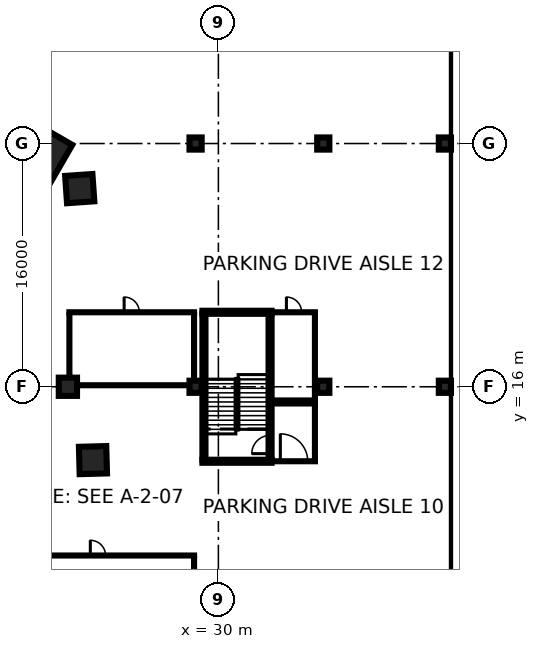
"""IFC4 building model, lengths in metres.
Left out: names, types, materials, properties, quantities, classifications, styles, units other than length and angle.
Written with IfcOpenShell. Run it as: python <this file> out.ifc"""

import sys

from ifc_helpers import new_model, si_unit, direction, frame, frame_2d, origin, origin_2d, place, context, subcontext, project, spatial, rectangle, extrude, element, fill, save


model = new_model("IFC4")
c1 = context("Model", 3, precision=1e-05, world=origin(), true_north=direction((0.0, 1.0)))
c2 = subcontext(c1, "Body", "Model", "MODEL_VIEW")
j1 = project(units=[si_unit("LENGTHUNIT", "METRE"), si_unit("PLANEANGLEUNIT", "RADIAN")], contexts=[c1])
p1 = place(None, origin())
s1 = spatial("IfcSite", under=j1, at=p1, CompositionType="ELEMENT")
p2 = place(p1, origin())
s2 = spatial("IfcBuilding", under=s1, at=p2, CompositionType="ELEMENT")
p3 = place(p2, frame((0.0, 0.0, -12.0)))
s3 = spatial("IfcBuildingStorey", under=s2, at=p3, CompositionType="ELEMENT", Elevation=-12.0)
p4 = place(p3, frame((45.75, -80.0, 0.0), z_axis=(0.0, 0.0, 1.0), x_axis=(0.0, 1.0, 0.0)))
e1 = element("IfcWall", 1, at=p4, inside=s3, PredefinedType="USERDEFINED", context=c2, shape_type="SweptSolid", body=[
    extrude(rectangle(XDim=160.0, YDim=0.9, at=frame_2d((80.0, 0.0))), origin(), (0.0, 0.0, 1.0), 11.55),
])
p5 = place(p2, frame((0.0, 0.0, -3.6)))
s4 = spatial("IfcBuildingStorey", under=s2, at=p5, CompositionType="ELEMENT", Elevation=-3.6)
p6 = place(p5, frame((17.865, 30.942, -0.4), z_axis=(0.0, 0.0, 1.0), x_axis=(0.5, 0.866025403784, 0.0)))
e2 = element("IfcColumn", 2, at=p6, inside=s4, PredefinedType="COLUMN", context=c2, shape_type="SweptSolid", body=[
    extrude(rectangle(XDim=4.2, YDim=3.4, at=origin_2d()), origin(), (0.0, 0.0, 1.0), 3.55),
])
for number, where, z_axis, x_axis in (
    (3, (21.749, 11.174, -0.4), (0.0, 0.0, 1.0), (1.0, 0.027, 0.0)),
    (4, (20.879, 29.034, -0.4), (0.0, 0.0, 1.0), (0.998, 0.07, 0.0)),
):
    element("IfcColumn", number, at=place(p5, frame(where, z_axis=z_axis, x_axis=x_axis)), inside=s4, PredefinedType="COLUMN", context=c2, shape_type="SweptSolid", body=[
        extrude(rectangle(XDim=1.8, YDim=1.8, at=origin_2d()), origin(), (0.0, 0.0, 1.0), 3.55),
    ])
p7 = place(p5, frame((20.1, 16.0, -0.4), z_axis=(0.0, 0.0, 1.0), x_axis=(1.0, 0.0, 0.0)))
e5 = element("IfcColumn", 5, at=p7, inside=s4, PredefinedType="COLUMN", context=c2, shape_type="SweptSolid", body=[
    extrude(rectangle(XDim=1.2, YDim=1.2, at=origin_2d()), origin(), (0.0, 0.0, 1.0), 3.55),
])
for number, where, z_axis, x_axis in (
    (6, (28.5, 16.0, -0.4), (0.0, 0.0, 1.0), (1.0, 0.0, 0.0)),
    (7, (28.5, 32.0, -0.4), (0.0, 0.0, 1.0), (1.0, 0.0, 0.0)),
    (8, (36.9, 16.0, -0.4), (0.0, 0.0, 1.0), (1.0, 0.0, 0.0)),
    (9, (36.9, 32.0, -0.4), (0.0, 0.0, 1.0), (1.0, 0.0, 0.0)),
    (10, (44.9, 16.0, -0.4), (0.0, 0.0, 1.0), (1.0, 0.0, 0.0)),
    (11, (44.9, 32.0, -0.4), (0.0, 0.0, 1.0), (1.0, 0.0, 0.0)),
):
    element("IfcColumn", number, at=place(p5, frame(where, z_axis=z_axis, x_axis=x_axis)), inside=s4, PredefinedType="COLUMN", context=c2, shape_type="SweptSolid", body=[
        extrude(rectangle(XDim=0.8, YDim=0.8, at=origin_2d()), origin(), (0.0, 0.0, 1.0), 3.55),
    ])
p8 = place(p5, frame((15.653, 4.9, 0.0), z_axis=(0.0, 0.0, 1.0), x_axis=(1.0, 0.0, 0.0)))
e12 = element("IfcWall", 12, at=p8, inside=s4, PredefinedType="PARTITIONING", context=c2, shape_type="SweptSolid", body=[
    extrude(rectangle(XDim=12.847, YDim=0.2, at=frame_2d((6.424, 0.0))), origin(), (0.0, 0.0, 1.0), 3.15),
])
p9 = place(p8, frame((5.924, 0.0, 0.0)))
e13 = element("IfcOpeningElement", 13, at=p9, cuts=e12, PredefinedType="OPENING", context=c2, shape_type="SweptSolid", body=[
    extrude(rectangle(XDim=1.0, YDim=2.1, at=frame_2d((0.5, 1.05))), frame((0.0, 0.11, 0.0), z_axis=(0.0, -1.0, 0.0), x_axis=(1.0, 0.0, 0.0)), (0.0, 0.0, 1.0), 0.22),
])
p10 = place(p5, frame((28.4, 0.4, 0.0), z_axis=(0.0, 0.0, 1.0), x_axis=(0.0, 1.0, 0.0)))
e14 = element("IfcWall", 14, at=p10, inside=s4, PredefinedType="PARTITIONING", context=c2, shape_type="SweptSolid", body=[
    extrude(rectangle(XDim=4.4, YDim=0.2, at=frame_2d((2.2, 0.0))), origin(), (0.0, 0.0, 1.0), 3.15),
])
p11 = place(p5, frame((20.1, 16.1, 0.0), z_axis=(0.0, 0.0, 1.0), x_axis=(1.0, 0.0, 0.0)))
e15 = element("IfcWall", 15, at=p11, inside=s4, PredefinedType="PARTITIONING", context=c2, shape_type="SweptSolid", body=[
    extrude(rectangle(XDim=8.4, YDim=0.2, at=frame_2d((4.2, 0.0))), origin(), (0.0, 0.0, 1.0), 3.15),
])
p12 = place(p5, frame((20.1, 20.9, 0.0), z_axis=(0.0, 0.0, 1.0), x_axis=(1.0, 0.0, 0.0)))
e16 = element("IfcWall", 16, at=p12, inside=s4, PredefinedType="PARTITIONING", context=c2, shape_type="SweptSolid", body=[
    extrude(rectangle(XDim=8.4, YDim=0.2, at=frame_2d((4.2, 0.0))), origin(), (0.0, 0.0, 1.0), 3.15),
])
p13 = place(p12, frame((3.7, 0.0, 0.0)))
e17 = element("IfcOpeningElement", 17, at=p13, cuts=e16, PredefinedType="OPENING", context=c2, shape_type="SweptSolid", body=[
    extrude(rectangle(XDim=1.0, YDim=2.1, at=frame_2d((0.5, 1.05))), frame((0.0, 0.11, 0.0), z_axis=(0.0, -1.0, 0.0), x_axis=(1.0, 0.0, 0.0)), (0.0, 0.0, 1.0), 0.22),
])
p14 = place(p5, frame((20.2, 16.6, 0.0), z_axis=(0.0, 0.0, 1.0), x_axis=(0.0, 1.0, 0.0)))
e18 = element("IfcWall", 18, at=p14, inside=s4, PredefinedType="PARTITIONING", context=c2, shape_type="SweptSolid", body=[
    extrude(rectangle(XDim=4.2, YDim=0.2, at=frame_2d((2.1, 0.0))), origin(), (0.0, 0.0, 1.0), 3.15),
])
p15 = place(p5, frame((28.4, 16.4, 0.0), z_axis=(0.0, 0.0, 1.0), x_axis=(0.0, 1.0, 0.0)))
e19 = element("IfcWall", 19, at=p15, inside=s4, PredefinedType="PARTITIONING", context=c2, shape_type="SweptSolid", body=[
    extrude(rectangle(XDim=4.4, YDim=0.2, at=frame_2d((2.2, 0.0))), origin(), (0.0, 0.0, 1.0), 3.15),
])
p16 = place(p5, frame((33.5, 11.1, 0.0), z_axis=(0.0, 0.0, 1.0), x_axis=(1.0, 0.0, 0.0)))
e20 = element("IfcWall", 20, at=p16, inside=s4, PredefinedType="PARTITIONING", context=c2, shape_type="SweptSolid", body=[
    extrude(rectangle(XDim=2.95, YDim=0.2, at=frame_2d((1.475, 0.0))), origin(), (0.0, 0.0, 1.0), 3.15),
])
p17 = place(p16, frame((0.575, 0.0, 0.0)))
e21 = element("IfcOpeningElement", 21, at=p17, cuts=e20, PredefinedType="OPENING", context=c2, shape_type="SweptSolid", body=[
    extrude(rectangle(XDim=1.8, YDim=2.1, at=frame_2d((0.9, 1.05))), frame((0.0, 0.11, 0.0), z_axis=(0.0, -1.0, 0.0), x_axis=(1.0, 0.0, 0.0)), (0.0, 0.0, 1.0), 0.22),
])
p18 = place(p5, frame((33.5, 14.9, 0.0), z_axis=(0.0, 0.0, 1.0), x_axis=(1.0, 0.0, 0.0)))
e22 = element("IfcWall", 22, at=p18, inside=s4, PredefinedType="PARTITIONING", context=c2, shape_type="SweptSolid", body=[
    extrude(rectangle(XDim=2.95, YDim=0.2, at=frame_2d((1.475, 0.0))), origin(), (0.0, 0.0, 1.0), 3.15),
])
p19 = place(p5, frame((36.35, 11.2, 0.0), z_axis=(0.0, 0.0, 1.0), x_axis=(0.0, 1.0, 0.0)))
e23 = element("IfcWall", 23, at=p19, inside=s4, PredefinedType="PARTITIONING", context=c2, shape_type="SweptSolid", body=[
    extrude(rectangle(XDim=3.6, YDim=0.2, at=frame_2d((1.8, 0.0))), origin(), (0.0, 0.0, 1.0), 3.15),
])
p20 = place(p5, frame((33.5, 15.1, 0.0), z_axis=(0.0, 0.0, 1.0), x_axis=(1.0, 0.0, 0.0)))
e24 = element("IfcWall", 24, at=p20, inside=s4, PredefinedType="PARTITIONING", context=c2, shape_type="SweptSolid", body=[
    extrude(rectangle(XDim=2.95, YDim=0.2, at=frame_2d((1.475, 0.0))), origin(), (0.0, 0.0, 1.0), 3.15),
])
p21 = place(p5, frame((33.5, 20.9, 0.0), z_axis=(0.0, 0.0, 1.0), x_axis=(1.0, 0.0, 0.0)))
e25 = element("IfcWall", 25, at=p21, inside=s4, PredefinedType="PARTITIONING", context=c2, shape_type="SweptSolid", body=[
    extrude(rectangle(XDim=2.95, YDim=0.2, at=frame_2d((1.475, 0.0))), origin(), (0.0, 0.0, 1.0), 3.15),
])
p22 = place(p21, frame((0.975, 0.0, 0.0)))
e26 = element("IfcOpeningElement", 26, at=p22, cuts=e25, PredefinedType="OPENING", context=c2, shape_type="SweptSolid", body=[
    extrude(rectangle(XDim=1.0, YDim=2.1, at=frame_2d((0.5, 1.05))), frame((0.0, 0.11, 0.0), z_axis=(0.0, -1.0, 0.0), x_axis=(1.0, 0.0, 0.0)), (0.0, 0.0, 1.0), 0.22),
])
p23 = place(p5, frame((36.35, 15.2, 0.0), z_axis=(0.0, 0.0, 1.0), x_axis=(0.0, 1.0, 0.0)))
e27 = element("IfcWall", 27, at=p23, inside=s4, PredefinedType="PARTITIONING", context=c2, shape_type="SweptSolid", body=[
    extrude(rectangle(XDim=5.6, YDim=0.2, at=frame_2d((2.8, 0.0))), origin(), (0.0, 0.0, 1.0), 3.15),
])
p24 = place(p5, frame((29.05, 11.2, 0.0), z_axis=(0.0, 0.0, 1.0), x_axis=(0.0, 1.0, 0.0)))
e28 = element("IfcWall", 28, at=p24, inside=s4, PredefinedType="SOLIDWALL", context=c2, shape_type="SweptSolid", body=[
    extrude(rectangle(XDim=9.6, YDim=0.2, at=frame_2d((4.8, 0.0))), origin(), (0.0, 0.0, 1.0), 3.15),
])
p25 = place(p5, frame((33.4, 11.2, 0.0), z_axis=(0.0, 0.0, 1.0), x_axis=(0.0, 1.0, 0.0)))
e29 = element("IfcWall", 29, at=p25, inside=s4, PredefinedType="SOLIDWALL", context=c2, shape_type="SweptSolid", body=[
    extrude(rectangle(XDim=9.6, YDim=0.2, at=frame_2d((4.8, 0.0))), origin(), (0.0, 0.0, 1.0), 3.15),
])
p26 = place(p25, frame((0.4, 0.0, 0.0)))
e30 = element("IfcOpeningElement", 30, at=p26, cuts=e29, PredefinedType="OPENING", context=c2, shape_type="SweptSolid", body=[
    extrude(rectangle(XDim=1.2, YDim=2.1, at=frame_2d((0.6, 1.05))), frame((0.0, 0.11, 0.0), z_axis=(0.0, -1.0, 0.0), x_axis=(1.0, 0.0, 0.0)), (0.0, 0.0, 1.0), 0.22),
])
for number, where, z_axis, x_axis in (
    (31, (33.5, 11.1, 0.0), (0.0, 0.0, 1.0), (-1.0, 0.0, 0.0)),
    (32, (28.95, 20.9, 0.0), (0.0, 0.0, 1.0), (1.0, 0.0, 0.0)),
):
    element("IfcWall", number, at=place(p5, frame(where, z_axis=z_axis, x_axis=x_axis)), inside=s4, PredefinedType="SOLIDWALL", context=c2, shape_type="SweptSolid", body=[
        extrude(rectangle(XDim=4.55, YDim=0.2, at=frame_2d((2.275, 0.0))), origin(), (0.0, 0.0, 1.0), 3.15),
    ])
p27 = place(p9, origin())
e33 = element("IfcDoor", 33, at=p27, inside=s4, OperationType="SINGLE_SWING_LEFT", PredefinedType="DOOR", context=c2, shape_type="SweptSolid", body=[
    extrude(rectangle(XDim=1.0, YDim=2.1, at=frame_2d((0.5, 1.05))), frame((0.0, 0.025, 0.0), z_axis=(0.0, -1.0, 0.0), x_axis=(1.0, 0.0, 0.0)), (0.0, 0.0, 1.0), 0.05),
])
fill(e13, e33)
p28 = place(p13, origin())
e34 = element("IfcDoor", 34, at=p28, inside=s4, OperationType="SINGLE_SWING_LEFT", PredefinedType="DOOR", context=c2, shape_type="SweptSolid", body=[
    extrude(rectangle(XDim=1.0, YDim=2.1, at=frame_2d((0.5, 1.05))), frame((0.0, 0.025, 0.0), z_axis=(0.0, -1.0, 0.0), x_axis=(1.0, 0.0, 0.0)), (0.0, 0.0, 1.0), 0.05),
])
fill(e17, e34)
p29 = place(p17, origin())
e35 = element("IfcDoor", 35, at=p29, inside=s4, OperationType="DOUBLE_DOOR_SINGLE_SWING", PredefinedType="DOOR", context=c2, shape_type="SweptSolid", body=[
    extrude(rectangle(XDim=1.8, YDim=2.1, at=frame_2d((0.9, 1.05))), frame((0.0, 0.025, 0.0), z_axis=(0.0, -1.0, 0.0), x_axis=(1.0, 0.0, 0.0)), (0.0, 0.0, 1.0), 0.05),
])
fill(e21, e35)
p30 = place(p22, origin())
e36 = element("IfcDoor", 36, at=p30, inside=s4, OperationType="SINGLE_SWING_LEFT", PredefinedType="DOOR", context=c2, shape_type="SweptSolid", body=[
    extrude(rectangle(XDim=1.0, YDim=2.1, at=frame_2d((0.5, 1.05))), frame((0.0, 0.025, 0.0), z_axis=(0.0, -1.0, 0.0), x_axis=(1.0, 0.0, 0.0)), (0.0, 0.0, 1.0), 0.05),
])
fill(e26, e36)
p31 = place(p26, origin())
e37 = element("IfcDoor", 37, at=p31, inside=s4, OperationType="SINGLE_SWING_LEFT", PredefinedType="DOOR", context=c2, shape_type="SweptSolid", body=[
    extrude(rectangle(XDim=1.2, YDim=2.1, at=frame_2d((0.6, 1.05))), frame((0.0, 0.025, 0.0), z_axis=(0.0, -1.0, 0.0), x_axis=(1.0, 0.0, 0.0)), (0.0, 0.0, 1.0), 0.05),
])
fill(e30, e37)
save(model, sys.argv[1])
